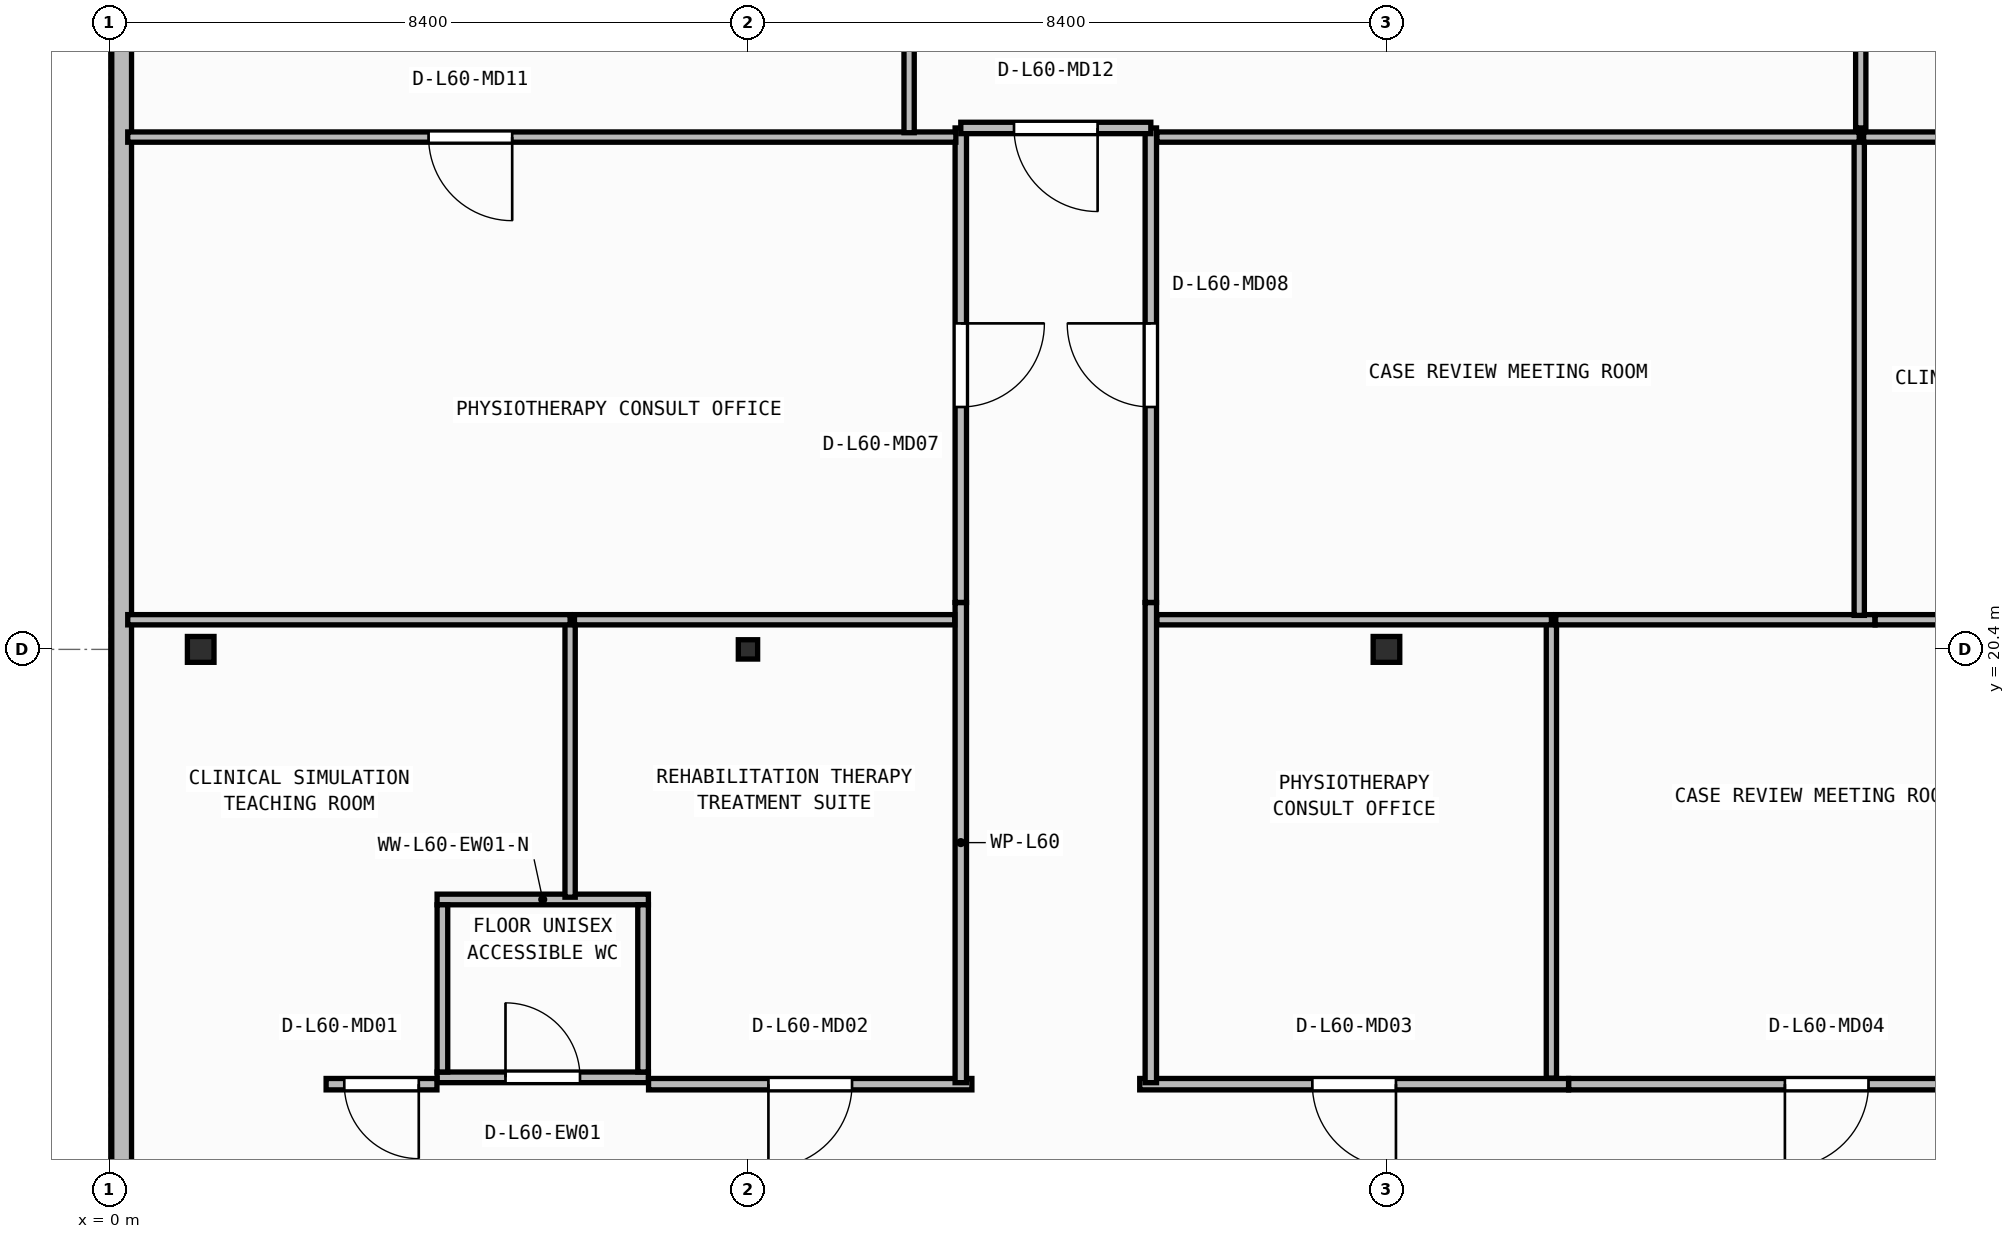
"""IFC4 building model, lengths in metres.
Left out: names, types, materials, properties, quantities, classifications, styles, units other than length and angle.
Written with IfcOpenShell. Run it as: python <this file> out.ifc"""

import sys

from ifc_helpers import new_model, si_unit, direction, frame, frame_2d, origin, origin_2d, place, context, subcontext, project, spatial, rectangle, i_section, extrude, element, fill, save


model = new_model("IFC4")
c1 = context("Model", 3, precision=1e-05, world=origin(), true_north=direction((0.0, 1.0)))
c2 = subcontext(c1, "Body", "Model", "MODEL_VIEW")
j1 = project(units=[si_unit("LENGTHUNIT", "METRE"), si_unit("PLANEANGLEUNIT", "RADIAN")], contexts=[c1])
p1 = place(None, origin())
s1 = spatial("IfcSite", under=j1, at=p1, CompositionType="ELEMENT")
p2 = place(p1, origin())
s2 = spatial("IfcBuilding", under=s1, at=p2, CompositionType="ELEMENT")
p3 = place(p2, frame((0.0, 0.0, 244.7)))
s3 = spatial("IfcBuildingStorey", under=s2, at=p3, CompositionType="ELEMENT", Elevation=244.7)
p4 = place(p3, frame((1.2, 20.4, 0.0), z_axis=(0.0, 0.0, 1.0), x_axis=(1.0, 0.0, 0.0)))
e1 = element("IfcColumn", 1, at=p4, inside=s3, PredefinedType="COLUMN", context=c2, shape_type="SweptSolid", body=[
    extrude(i_section(OverallWidth=0.35, OverallDepth=0.34, WebThickness=0.016, FlangeThickness=0.028, at=origin_2d()), origin(), (0.0, 0.0, 1.0), 3.95),
])
p5 = place(p3, frame((8.4, 20.4, 0.0), z_axis=(0.0, 0.0, 1.0), x_axis=(1.0, 0.0, 0.0)))
e2 = element("IfcColumn", 2, at=p5, inside=s3, PredefinedType="COLUMN", context=c2, shape_type="SweptSolid", body=[
    extrude(i_section(OverallWidth=0.254, OverallDepth=0.254, WebThickness=0.009, FlangeThickness=0.014, FilletRadius=0.013, at=origin_2d()), origin(), (0.0, 0.0, 1.0), 3.95),
])
p6 = place(p3, frame((16.8, 20.4, 0.0), z_axis=(0.0, 0.0, 1.0), x_axis=(1.0, 0.0, 0.0)))
e3 = element("IfcColumn", 3, at=p6, inside=s3, PredefinedType="COLUMN", context=c2, shape_type="SweptSolid", body=[
    extrude(i_section(OverallWidth=0.35, OverallDepth=0.34, WebThickness=0.016, FlangeThickness=0.028, at=origin_2d()), origin(), (0.0, 0.0, 1.0), 3.95),
])
p7 = place(p3, frame((0.16, 39.54, 0.0), z_axis=(0.0, 0.0, 1.0), x_axis=(0.0, -1.0, 0.0)))
e4 = element("IfcWall", 4, at=p7, inside=s3, PredefinedType="STANDARD", context=c2, shape_type="SweptSolid", body=[
    extrude(rectangle(XDim=36.88, YDim=0.26, at=frame_2d((18.44, 0.0))), origin(), (0.0, 0.0, 1.0), 3.71),
])
p8 = place(p7, frame((26.625, 0.0, 0.9)))
e5 = element("IfcOpeningElement", 5, at=p8, cuts=e4, PredefinedType="OPENING", context=c2, shape_type="SweptSolid", body=[
    extrude(rectangle(XDim=2.4, YDim=1.65, at=frame_2d((1.2, 0.825))), frame((0.0, 0.14, 0.0), z_axis=(0.0, -1.0, 0.0), x_axis=(1.0, 0.0, 0.0)), (0.0, 0.0, 1.0), 0.28),
])
p9 = place(p3, frame((4.31, 14.77, 0.0), z_axis=(0.0, 0.0, 1.0), x_axis=(1.0, 0.0, 0.0)))
e6 = element("IfcWall", 6, at=p9, inside=s3, PredefinedType="PARTITIONING", context=c2, shape_type="SweptSolid", body=[
    extrude(rectangle(XDim=2.78, YDim=0.14, at=frame_2d((1.39, 0.0))), origin(), (0.0, 0.0, 1.0), 3.71),
])
p10 = place(p9, frame((0.9, 0.0, 0.0)))
e7 = element("IfcOpeningElement", 7, at=p10, cuts=e6, PredefinedType="OPENING", context=c2, shape_type="SweptSolid", body=[
    extrude(rectangle(XDim=0.98, YDim=2.1, at=frame_2d((0.49, 1.05))), frame((0.0, 0.08, 0.0), z_axis=(0.0, -1.0, 0.0), x_axis=(1.0, 0.0, 0.0)), (0.0, 0.0, 1.0), 0.16),
])
p11 = place(p3, frame((4.31, 17.11, 0.0), z_axis=(0.0, 0.0, 1.0), x_axis=(1.0, 0.0, 0.0)))
e8 = element("IfcWall", 8, at=p11, inside=s3, PredefinedType="PARTITIONING", context=c2, shape_type="SweptSolid", body=[
    extrude(rectangle(XDim=2.78, YDim=0.14, at=frame_2d((1.39, 0.0))), origin(), (0.0, 0.0, 1.0), 3.71),
])
for number, where, z_axis, x_axis in (
    (9, (4.38, 14.84, 0.0), (0.0, 0.0, 1.0), (0.0, 1.0, 0.0)),
    (10, (7.02, 14.84, 0.0), (0.0, 0.0, 1.0), (0.0, 1.0, 0.0)),
):
    element("IfcWall", number, at=place(p3, frame(where, z_axis=z_axis, x_axis=x_axis)), inside=s3, PredefinedType="PARTITIONING", context=c2, shape_type="SweptSolid", body=[
        extrude(rectangle(XDim=2.2, YDim=0.14, at=frame_2d((1.1, 0.0))), origin(), (0.0, 0.0, 1.0), 3.71),
    ])
p12 = place(p3, frame((4.308, 14.68, 0.0), z_axis=(0.0, 0.0, 1.0), x_axis=(-1.0, 0.0, 0.0)))
e11 = element("IfcWall", 11, at=p12, inside=s3, PredefinedType="PARTITIONING", context=c2, shape_type="SweptSolid", body=[
    extrude(rectangle(XDim=1.458, YDim=0.15, at=frame_2d((0.729, 0.0))), origin(), (0.0, 0.0, 1.0), 3.71),
])
p13 = place(p12, frame((0.239, 0.0, 0.0)))
e12 = element("IfcOpeningElement", 12, at=p13, cuts=e11, PredefinedType="OPENING", context=c2, shape_type="SweptSolid", body=[
    extrude(rectangle(XDim=0.98, YDim=2.1, at=frame_2d((0.49, 1.05))), frame((0.0, 0.085, 0.0), z_axis=(0.0, -1.0, 0.0), x_axis=(1.0, 0.0, 0.0)), (0.0, 0.0, 1.0), 0.17),
])
p14 = place(p3, frame((11.346, 14.68, 0.0), z_axis=(0.0, 0.0, 1.0), x_axis=(-1.0, 0.0, 0.0)))
e13 = element("IfcWall", 13, at=p14, inside=s3, PredefinedType="PARTITIONING", context=c2, shape_type="SweptSolid", body=[
    extrude(rectangle(XDim=4.254, YDim=0.15, at=frame_2d((2.127, 0.0))), origin(), (0.0, 0.0, 1.0), 3.71),
])
p15 = place(p14, frame((1.577, 0.0, 0.0)))
e14 = element("IfcOpeningElement", 14, at=p15, cuts=e13, PredefinedType="OPENING", context=c2, shape_type="SweptSolid", body=[
    extrude(rectangle(XDim=1.1, YDim=2.1, at=frame_2d((0.55, 1.05))), frame((0.0, 0.085, 0.0), z_axis=(0.0, -1.0, 0.0), x_axis=(1.0, 0.0, 0.0)), (0.0, 0.0, 1.0), 0.17),
])
p16 = place(p3, frame((19.196, 14.68, 0.0), z_axis=(0.0, 0.0, 1.0), x_axis=(-1.0, 0.0, 0.0)))
e15 = element("IfcWall", 15, at=p16, inside=s3, PredefinedType="PARTITIONING", context=c2, shape_type="SweptSolid", body=[
    extrude(rectangle(XDim=5.642, YDim=0.15, at=frame_2d((2.821, 0.0))), origin(), (0.0, 0.0, 1.0), 3.71),
])
p17 = place(p16, frame((2.271, 0.0, 0.0)))
e16 = element("IfcOpeningElement", 16, at=p17, cuts=e15, PredefinedType="OPENING", context=c2, shape_type="SweptSolid", body=[
    extrude(rectangle(XDim=1.1, YDim=2.1, at=frame_2d((0.55, 1.05))), frame((0.0, 0.085, 0.0), z_axis=(0.0, -1.0, 0.0), x_axis=(1.0, 0.0, 0.0)), (0.0, 0.0, 1.0), 0.17),
])
p18 = place(p3, frame((25.986, 14.68, 0.0), z_axis=(0.0, 0.0, 1.0), x_axis=(-1.0, 0.0, 0.0)))
e17 = element("IfcWall", 17, at=p18, inside=s3, PredefinedType="PARTITIONING", context=c2, shape_type="SweptSolid", body=[
    extrude(rectangle(XDim=6.788, YDim=0.15, at=frame_2d((3.394, 0.0))), origin(), (0.0, 0.0, 1.0), 3.71),
])
p19 = place(p18, frame((2.844, 0.0, 0.0)))
e18 = element("IfcOpeningElement", 18, at=p19, cuts=e17, PredefinedType="OPENING", context=c2, shape_type="SweptSolid", body=[
    extrude(rectangle(XDim=1.1, YDim=2.1, at=frame_2d((0.55, 1.05))), frame((0.0, 0.085, 0.0), z_axis=(0.0, -1.0, 0.0), x_axis=(1.0, 0.0, 0.0)), (0.0, 0.0, 1.0), 0.17),
])
for number, where, z_axis, x_axis in (
    (19, (11.2, 21.016, 0.0), (0.0, 0.0, 1.0), (0.0, -1.0, 0.0)),
    (20, (13.7, 14.7, 0.0), (0.0, 0.0, 1.0), (0.0, 1.0, 0.0)),
):
    element("IfcWall", number, at=place(p3, frame(where, z_axis=z_axis, x_axis=x_axis)), inside=s3, PredefinedType="PARTITIONING", context=c2, shape_type="SweptSolid", body=[
        extrude(rectangle(XDim=6.316, YDim=0.15, at=frame_2d((3.158, 0.0))), origin(), (0.0, 0.0, 1.0), 3.71),
    ])
p20 = place(p3, frame((11.2, 27.26, 0.0), z_axis=(0.0, 0.0, 1.0), x_axis=(0.0, -1.0, 0.0)))
e21 = element("IfcWall", 21, at=p20, inside=s3, PredefinedType="PARTITIONING", context=c2, shape_type="SweptSolid", body=[
    extrude(rectangle(XDim=6.242, YDim=0.15, at=frame_2d((3.121, 0.0))), origin(), (0.0, 0.0, 1.0), 3.71),
])
p21 = place(p20, frame((2.571, 0.0, 0.0)))
e22 = element("IfcOpeningElement", 22, at=p21, cuts=e21, PredefinedType="OPENING", context=c2, shape_type="SweptSolid", body=[
    extrude(rectangle(XDim=1.1, YDim=2.1, at=frame_2d((0.55, 1.05))), frame((0.0, 0.085, 0.0), z_axis=(0.0, -1.0, 0.0), x_axis=(1.0, 0.0, 0.0)), (0.0, 0.0, 1.0), 0.17),
])
p22 = place(p3, frame((13.7, 21.018, 0.0), z_axis=(0.0, 0.0, 1.0), x_axis=(0.0, 1.0, 0.0)))
e23 = element("IfcWall", 23, at=p22, inside=s3, PredefinedType="PARTITIONING", context=c2, shape_type="SweptSolid", body=[
    extrude(rectangle(XDim=6.242, YDim=0.15, at=frame_2d((3.121, 0.0))), origin(), (0.0, 0.0, 1.0), 3.71),
])
p23 = place(p22, frame((2.571, 0.0, 0.0)))
e24 = element("IfcOpeningElement", 24, at=p23, cuts=e23, PredefinedType="OPENING", context=c2, shape_type="SweptSolid", body=[
    extrude(rectangle(XDim=1.1, YDim=2.1, at=frame_2d((0.55, 1.05))), frame((0.0, 0.085, 0.0), z_axis=(0.0, -1.0, 0.0), x_axis=(1.0, 0.0, 0.0)), (0.0, 0.0, 1.0), 0.17),
])
p24 = place(p3, frame((13.7, 27.26, 0.0), z_axis=(0.0, 0.0, 1.0), x_axis=(-1.0, 0.0, 0.0)))
e25 = element("IfcWall", 25, at=p24, inside=s3, PredefinedType="PARTITIONING", context=c2, shape_type="SweptSolid", body=[
    extrude(rectangle(XDim=2.5, YDim=0.15, at=frame_2d((1.25, 0.0))), origin(), (0.0, 0.0, 1.0), 3.71),
])
p25 = place(p24, frame((0.7, 0.0, 0.0)))
e26 = element("IfcOpeningElement", 26, at=p25, cuts=e25, PredefinedType="OPENING", context=c2, shape_type="SweptSolid", body=[
    extrude(rectangle(XDim=1.1, YDim=2.1, at=frame_2d((0.55, 1.05))), frame((0.0, 0.085, 0.0), z_axis=(0.0, -1.0, 0.0), x_axis=(1.0, 0.0, 0.0)), (0.0, 0.0, 1.0), 0.17),
])
p26 = place(p3, frame((6.06, 17.14, 0.0), z_axis=(0.0, 0.0, 1.0), x_axis=(0.0, 1.0, 0.0)))
e27 = element("IfcWall", 27, at=p26, inside=s3, PredefinedType="PARTITIONING", context=c2, shape_type="SweptSolid", body=[
    extrude(rectangle(XDim=3.65, YDim=0.135, at=frame_2d((1.825, 0.0))), origin(), (0.0, 0.0, 1.0), 3.71),
])
p27 = place(p3, frame((6.06, 20.79, 0.0), z_axis=(0.0, 0.0, 1.0), x_axis=(-1.0, 0.0, 0.0)))
e28 = element("IfcWall", 28, at=p27, inside=s3, PredefinedType="PARTITIONING", context=c2, shape_type="SweptSolid", body=[
    extrude(rectangle(XDim=5.82, YDim=0.135, at=frame_2d((2.91, 0.0))), origin(), (0.0, 0.0, 1.0), 3.157),
])
p28 = place(p3, frame((11.12, 20.79, 0.0), z_axis=(0.0, 0.0, 1.0), x_axis=(-1.0, 0.0, 0.0)))
e29 = element("IfcWall", 29, at=p28, inside=s3, PredefinedType="PARTITIONING", context=c2, shape_type="SweptSolid", body=[
    extrude(rectangle(XDim=5.003, YDim=0.135, at=frame_2d((2.501, 0.0))), origin(), (0.0, 0.0, 1.0), 3.157),
])
p29 = place(p3, frame((18.97, 14.76, 0.0), z_axis=(0.0, 0.0, 1.0), x_axis=(0.0, 1.0, 0.0)))
e30 = element("IfcWall", 30, at=p29, inside=s3, PredefinedType="PARTITIONING", context=c2, shape_type="SweptSolid", body=[
    extrude(rectangle(XDim=6.03, YDim=0.135, at=frame_2d((3.015, 0.0))), origin(), (0.0, 0.0, 1.0), 3.71),
])
p30 = place(p3, frame((18.97, 20.79, 0.0), z_axis=(0.0, 0.0, 1.0), x_axis=(-1.0, 0.0, 0.0)))
e31 = element("IfcWall", 31, at=p30, inside=s3, PredefinedType="PARTITIONING", context=c2, shape_type="SweptSolid", body=[
    extrude(rectangle(XDim=5.19, YDim=0.135, at=frame_2d((2.595, 0.0))), origin(), (0.0, 0.0, 1.0), 3.157),
])
p31 = place(p3, frame((23.228, 20.79, 0.0), z_axis=(0.0, 0.0, 1.0), x_axis=(-1.0, 0.0, 0.0)))
e32 = element("IfcWall", 32, at=p31, inside=s3, PredefinedType="PARTITIONING", context=c2, shape_type="SweptSolid", body=[
    extrude(rectangle(XDim=4.2, YDim=0.135, at=frame_2d((2.1, 0.0))), origin(), (0.0, 0.0, 1.0), 3.157),
])
p32 = place(p3, frame((25.76, 20.79, 0.0), z_axis=(0.0, 0.0, 1.0), x_axis=(-1.0, 0.0, 0.0)))
e33 = element("IfcWall", 33, at=p32, inside=s3, PredefinedType="PARTITIONING", context=c2, shape_type="SweptSolid", body=[
    extrude(rectangle(XDim=2.531, YDim=0.135, at=frame_2d((1.265, 0.0))), origin(), (0.0, 0.0, 1.0), 3.157),
])
p33 = place(p3, frame((11.135, 27.14, 0.0), z_axis=(0.0, 0.0, 1.0), x_axis=(-1.0, 0.0, 0.0)))
e34 = element("IfcWall", 34, at=p33, inside=s3, PredefinedType="PARTITIONING", context=c2, shape_type="SweptSolid", body=[
    extrude(rectangle(XDim=10.895, YDim=0.135, at=frame_2d((5.448, 0.0))), origin(), (0.0, 0.0, 1.0), 3.71),
])
p34 = place(p33, frame((5.837, 0.0, 0.0)))
e35 = element("IfcOpeningElement", 35, at=p34, cuts=e34, PredefinedType="OPENING", context=c2, shape_type="SweptSolid", body=[
    extrude(rectangle(XDim=1.1, YDim=2.1, at=frame_2d((0.55, 1.05))), frame((0.0, 0.077, 0.0), z_axis=(0.0, -1.0, 0.0), x_axis=(1.0, 0.0, 0.0)), (0.0, 0.0, 1.0), 0.155),
])
p35 = place(p3, frame((23.02, 20.847, 0.0), z_axis=(0.0, 0.0, 1.0), x_axis=(0.0, 1.0, 0.0)))
e36 = element("IfcWall", 36, at=p35, inside=s3, PredefinedType="PARTITIONING", context=c2, shape_type="SweptSolid", body=[
    extrude(rectangle(XDim=6.292, YDim=0.135, at=frame_2d((3.146, 0.0))), origin(), (0.0, 0.0, 1.0), 3.71),
])
p36 = place(p3, frame((23.02, 27.14, 0.0), z_axis=(0.0, 0.0, 1.0), x_axis=(-1.0, 0.0, 0.0)))
e37 = element("IfcWall", 37, at=p36, inside=s3, PredefinedType="PARTITIONING", context=c2, shape_type="SweptSolid", body=[
    extrude(rectangle(XDim=9.24, YDim=0.135, at=frame_2d((4.62, 0.0))), origin(), (0.0, 0.0, 1.0), 3.71),
])
p37 = place(p3, frame((33.86, 27.14, 0.0), z_axis=(0.0, 0.0, 1.0), x_axis=(-1.0, 0.0, 0.0)))
e38 = element("IfcWall", 38, at=p37, inside=s3, PredefinedType="PARTITIONING", context=c2, shape_type="SweptSolid", body=[
    extrude(rectangle(XDim=10.783, YDim=0.135, at=frame_2d((5.391, 0.0))), origin(), (0.0, 0.0, 1.0), 3.71),
])
p38 = place(p37, frame((3.913, 0.0, 0.0)))
e39 = element("IfcOpeningElement", 39, at=p38, cuts=e38, PredefinedType="OPENING", context=c2, shape_type="SweptSolid", body=[
    extrude(rectangle(XDim=1.1, YDim=2.1, at=frame_2d((0.55, 1.05))), frame((0.0, 0.077, 0.0), z_axis=(0.0, -1.0, 0.0), x_axis=(1.0, 0.0, 0.0)), (0.0, 0.0, 1.0), 0.155),
])
p39 = place(p3, frame((10.52, 27.198, 0.0), z_axis=(0.0, 0.0, 1.0), x_axis=(0.0, 1.0, 0.0)))
e40 = element("IfcWall", 40, at=p39, inside=s3, PredefinedType="PARTITIONING", context=c2, shape_type="SweptSolid", body=[
    extrude(rectangle(XDim=9.164, YDim=0.135, at=frame_2d((4.582, 0.0))), origin(), (0.0, 0.0, 1.0), 3.71),
])
p40 = place(p3, frame((23.04, 27.26, 0.0), z_axis=(0.0, 0.0, 1.0), x_axis=(0.0, 1.0, 0.0)))
e41 = element("IfcWall", 41, at=p40, inside=s3, PredefinedType="PARTITIONING", context=c2, shape_type="SweptSolid", body=[
    extrude(rectangle(XDim=4.234, YDim=0.135, at=frame_2d((2.117, 0.0))), origin(), (0.0, 0.0, 1.0), 3.71),
])
p41 = place(p10, origin())
e42 = element("IfcDoor", 42, at=p41, inside=s3, OperationType="SINGLE_SWING_LEFT", PredefinedType="DOOR", context=c2, shape_type="SweptSolid", body=[
    extrude(rectangle(XDim=0.98, YDim=2.1, at=frame_2d((0.49, 1.05))), frame((0.0, 0.025, 0.0), z_axis=(0.0, -1.0, 0.0), x_axis=(1.0, 0.0, 0.0)), (0.0, 0.0, 1.0), 0.05),
])
fill(e7, e42)
p42 = place(p13, origin())
e43 = element("IfcDoor", 43, at=p42, inside=s3, OperationType="SINGLE_SWING_LEFT", PredefinedType="DOOR", context=c2, shape_type="SweptSolid", body=[
    extrude(rectangle(XDim=0.98, YDim=2.1, at=frame_2d((0.49, 1.05))), frame((0.0, 0.025, 0.0), z_axis=(0.0, -1.0, 0.0), x_axis=(1.0, 0.0, 0.0)), (0.0, 0.0, 1.0), 0.05),
])
fill(e12, e43)
p43 = place(p15, origin())
e44 = element("IfcDoor", 44, at=p43, inside=s3, OperationType="SINGLE_SWING_RIGHT", PredefinedType="DOOR", context=c2, shape_type="SweptSolid", body=[
    extrude(rectangle(XDim=1.1, YDim=2.1, at=frame_2d((0.55, 1.05))), frame((0.0, 0.025, 0.0), z_axis=(0.0, -1.0, 0.0), x_axis=(1.0, 0.0, 0.0)), (0.0, 0.0, 1.0), 0.05),
])
fill(e14, e44)
p44 = place(p17, origin())
e45 = element("IfcDoor", 45, at=p44, inside=s3, OperationType="SINGLE_SWING_LEFT", PredefinedType="DOOR", context=c2, shape_type="SweptSolid", body=[
    extrude(rectangle(XDim=1.1, YDim=2.1, at=frame_2d((0.55, 1.05))), frame((0.0, 0.025, 0.0), z_axis=(0.0, -1.0, 0.0), x_axis=(1.0, 0.0, 0.0)), (0.0, 0.0, 1.0), 0.05),
])
fill(e16, e45)
p45 = place(p19, origin())
e46 = element("IfcDoor", 46, at=p45, inside=s3, OperationType="SINGLE_SWING_RIGHT", PredefinedType="DOOR", context=c2, shape_type="SweptSolid", body=[
    extrude(rectangle(XDim=1.1, YDim=2.1, at=frame_2d((0.55, 1.05))), frame((0.0, 0.025, 0.0), z_axis=(0.0, -1.0, 0.0), x_axis=(1.0, 0.0, 0.0)), (0.0, 0.0, 1.0), 0.05),
])
fill(e18, e46)
p46 = place(p21, origin())
e47 = element("IfcDoor", 47, at=p46, inside=s3, OperationType="SINGLE_SWING_LEFT", PredefinedType="DOOR", context=c2, shape_type="SweptSolid", body=[
    extrude(rectangle(XDim=1.1, YDim=2.1, at=frame_2d((0.55, 1.05))), frame((0.0, 0.025, 0.0), z_axis=(0.0, -1.0, 0.0), x_axis=(1.0, 0.0, 0.0)), (0.0, 0.0, 1.0), 0.05),
])
fill(e22, e47)
p47 = place(p23, origin())
e48 = element("IfcDoor", 48, at=p47, inside=s3, OperationType="SINGLE_SWING_RIGHT", PredefinedType="DOOR", context=c2, shape_type="SweptSolid", body=[
    extrude(rectangle(XDim=1.1, YDim=2.1, at=frame_2d((0.55, 1.05))), frame((0.0, 0.025, 0.0), z_axis=(0.0, -1.0, 0.0), x_axis=(1.0, 0.0, 0.0)), (0.0, 0.0, 1.0), 0.05),
])
fill(e24, e48)
p48 = place(p25, origin())
e49 = element("IfcDoor", 49, at=p48, inside=s3, OperationType="SINGLE_SWING_LEFT", PredefinedType="DOOR", context=c2, shape_type="SweptSolid", body=[
    extrude(rectangle(XDim=1.1, YDim=2.1, at=frame_2d((0.55, 1.05))), frame((0.0, 0.025, 0.0), z_axis=(0.0, -1.0, 0.0), x_axis=(1.0, 0.0, 0.0)), (0.0, 0.0, 1.0), 0.05),
])
fill(e26, e49)
p49 = place(p34, origin())
e50 = element("IfcDoor", 50, at=p49, inside=s3, OperationType="SINGLE_SWING_LEFT", PredefinedType="DOOR", context=c2, shape_type="SweptSolid", body=[
    extrude(rectangle(XDim=1.1, YDim=2.1, at=frame_2d((0.55, 1.05))), frame((0.0, 0.025, 0.0), z_axis=(0.0, -1.0, 0.0), x_axis=(1.0, 0.0, 0.0)), (0.0, 0.0, 1.0), 0.05),
])
fill(e35, e50)
save(model, sys.argv[1])
